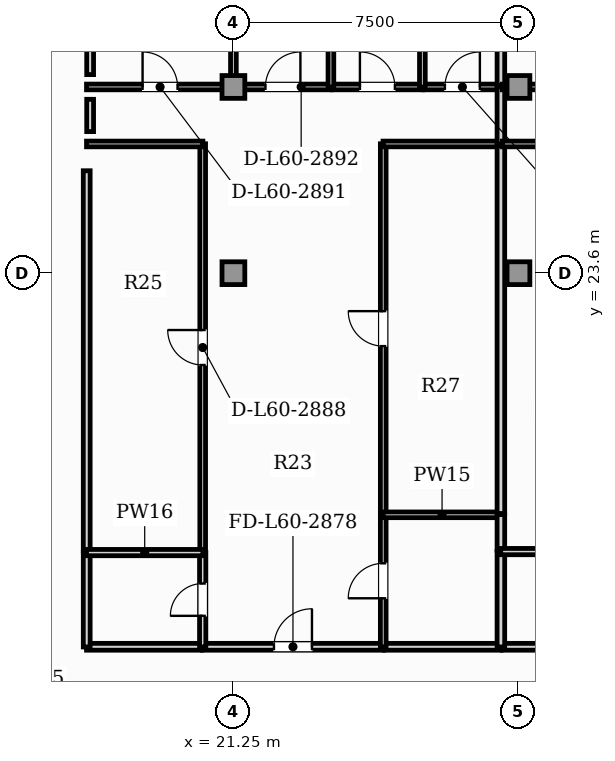
"""IFC4 building model, lengths in metres.
Left out: names, types, materials, properties, quantities, classifications, styles, units other than length and angle.
Written with IfcOpenShell. Run it as: python <this file> out.ifc"""

import sys

from ifc_helpers import new_model, si_unit, direction, frame, frame_2d, origin, origin_2d, place, context, subcontext, project, spatial, rectangle, extrude, element, fill, save


model = new_model("IFC4")
c1 = context("Model", 3, precision=1e-05, world=origin(), true_north=direction((0.0, 1.0)))
c2 = subcontext(c1, "Body", "Model", "MODEL_VIEW")
j1 = project(units=[si_unit("LENGTHUNIT", "METRE"), si_unit("PLANEANGLEUNIT", "RADIAN")], contexts=[c1])
p1 = place(None, origin())
s1 = spatial("IfcSite", under=j1, at=p1, CompositionType="ELEMENT")
p2 = place(p1, origin())
s2 = spatial("IfcBuilding", under=s1, at=p2, CompositionType="ELEMENT")
p3 = place(p2, frame((0.0, 0.0, 242.65)))
s3 = spatial("IfcBuildingStorey", under=s2, at=p3, CompositionType="ELEMENT", Elevation=242.65)
for number, where, z_axis, x_axis in (
    (1, (21.25, 23.6, 0.0), (0.0, 0.0, 1.0), (1.0, 0.0, 0.0)),
    (2, (28.75, 23.6, 0.0), (0.0, 0.0, 1.0), (1.0, 0.0, 0.0)),
    (3, (21.25, 28.5, 0.0), (0.0, 0.0, 1.0), (1.0, 0.0, 0.0)),
    (4, (28.75, 28.5, 0.0), (0.0, 0.0, 1.0), (1.0, 0.0, 0.0)),
):
    element("IfcColumn", number, at=place(p3, frame(where, z_axis=z_axis, x_axis=x_axis)), inside=s3, PredefinedType="COLUMN", context=c2, shape_type="SweptSolid", body=[
        extrude(rectangle(XDim=0.6, YDim=0.6, at=origin_2d()), origin(), (0.0, 0.0, 1.0), 3.85),
    ])
p4 = place(p3, frame((20.437, 13.77, 0.0), z_axis=(0.0, 0.0, 1.0), x_axis=(1.0, 0.0, 0.0)))
e5 = element("IfcWall", 5, at=p4, inside=s3, PredefinedType="PARTITIONING", context=c2, shape_type="SweptSolid", body=[
    extrude(rectangle(XDim=4.76, YDim=0.18, at=frame_2d((2.38, 0.0))), origin(), (0.0, 0.0, 1.0), 3.5),
])
p5 = place(p4, frame((1.88, 0.0, 0.0)))
e6 = element("IfcOpeningElement", 6, at=p5, cuts=e5, PredefinedType="OPENING", context=c2, shape_type="SweptSolid", body=[
    extrude(rectangle(XDim=1.0, YDim=2.15, at=frame_2d((0.5, 1.075))), frame((0.0, 0.1, 0.0), z_axis=(0.0, -1.0, 0.0), x_axis=(1.0, 0.0, 0.0)), (0.0, 0.0, 1.0), 0.2),
])
p6 = place(p3, frame((17.385, 13.77, 0.0), z_axis=(0.0, 0.0, 1.0), x_axis=(1.0, 0.0, 0.0)))
e7 = element("IfcWall", 7, at=p6, inside=s3, PredefinedType="PARTITIONING", context=c2, shape_type="SweptSolid", body=[
    extrude(rectangle(XDim=3.021, YDim=0.18, at=frame_2d((1.511, 0.0))), origin(), (0.0, 0.0, 1.0), 3.5),
])
p7 = place(p3, frame((17.39, 13.765, 0.0), z_axis=(0.0, 0.0, 1.0), x_axis=(0.0, 1.0, 0.0)))
e8 = element("IfcWall", 8, at=p7, inside=s3, PredefinedType="PARTITIONING", context=c2, shape_type="SweptSolid", body=[
    extrude(rectangle(XDim=2.489, YDim=0.18, at=frame_2d((1.244, 0.0))), origin(), (0.0, 0.0, 1.0), 3.5),
])
p8 = place(p3, frame((17.39, 16.283, 0.0), z_axis=(0.0, 0.0, 1.0), x_axis=(0.0, 1.0, 0.0)))
e9 = element("IfcWall", 9, at=p8, inside=s3, PredefinedType="PARTITIONING", context=c2, shape_type="SweptSolid", body=[
    extrude(rectangle(XDim=10.011, YDim=0.18, at=frame_2d((5.006, 0.0))), origin(), (0.0, 0.0, 1.0), 3.5),
])
p9 = place(p3, frame((25.227, 13.77, 0.0), z_axis=(0.0, 0.0, 1.0), x_axis=(1.0, 0.0, 0.0)))
e10 = element("IfcWall", 10, at=p9, inside=s3, PredefinedType="PARTITIONING", context=c2, shape_type="SweptSolid", body=[
    extrude(rectangle(XDim=3.066, YDim=0.18, at=frame_2d((1.533, 0.0))), origin(), (0.0, 0.0, 1.0), 3.5),
])
p10 = place(p3, frame((28.323, 13.77, 0.0), z_axis=(0.0, 0.0, 1.0), x_axis=(1.0, 0.0, 0.0)))
e11 = element("IfcWall", 11, at=p10, inside=s3, PredefinedType="PARTITIONING", context=c2, shape_type="SweptSolid", body=[
    extrude(rectangle(XDim=2.949, YDim=0.18, at=frame_2d((1.475, 0.0))), origin(), (0.0, 0.0, 1.0), 3.5),
])
p11 = place(p3, frame((20.442, 13.765, 0.0), z_axis=(0.0, 0.0, 1.0), x_axis=(0.0, 1.0, 0.0)))
e12 = element("IfcWall", 12, at=p11, inside=s3, PredefinedType="PLUMBINGWALL", context=c2, shape_type="SweptSolid", body=[
    extrude(rectangle(XDim=2.489, YDim=0.165, at=frame_2d((1.244, 0.0))), origin(), (0.0, 0.0, 1.0), 3.5),
])
p12 = place(p11, frame((0.819, 0.0, 0.0)))
e13 = element("IfcOpeningElement", 13, at=p12, cuts=e12, PredefinedType="OPENING", context=c2, shape_type="SweptSolid", body=[
    extrude(rectangle(XDim=0.85, YDim=2.1, at=frame_2d((0.425, 1.05))), frame((0.0, 0.093, 0.0), z_axis=(0.0, -1.0, 0.0), x_axis=(1.0, 0.0, 0.0)), (0.0, 0.0, 1.0), 0.185),
])
p13 = place(p3, frame((20.442, 16.283, 0.0), z_axis=(0.0, 0.0, 1.0), x_axis=(0.0, 1.0, 0.0)))
e14 = element("IfcWall", 14, at=p13, inside=s3, PredefinedType="PARTITIONING", context=c2, shape_type="SweptSolid", body=[
    extrude(rectangle(XDim=10.721, YDim=0.15, at=frame_2d((5.361, 0.0))), origin(), (0.0, 0.0, 1.0), 3.5),
])
p14 = place(p13, frame((4.901, 0.0, 0.0)))
e15 = element("IfcOpeningElement", 15, at=p14, cuts=e14, PredefinedType="OPENING", context=c2, shape_type="SweptSolid", body=[
    extrude(rectangle(XDim=0.92, YDim=2.1, at=frame_2d((0.46, 1.05))), frame((0.0, 0.085, 0.0), z_axis=(0.0, -1.0, 0.0), x_axis=(1.0, 0.0, 0.0)), (0.0, 0.0, 1.0), 0.17),
])
p15 = place(p3, frame((17.385, 27.0, 0.0), z_axis=(0.0, 0.0, 1.0), x_axis=(1.0, 0.0, 0.0)))
e16 = element("IfcWall", 16, at=p15, inside=s3, PredefinedType="PARTITIONING", context=c2, shape_type="SweptSolid", body=[
    extrude(rectangle(XDim=3.062, YDim=0.15, at=frame_2d((1.531, 0.0))), origin(), (0.0, 0.0, 1.0), 3.5),
])
p16 = place(p3, frame((25.192, 13.765, 0.0), z_axis=(0.0, 0.0, 1.0), x_axis=(0.0, 1.0, 0.0)))
e17 = element("IfcWall", 17, at=p16, inside=s3, PredefinedType="PARTITIONING", context=c2, shape_type="SweptSolid", body=[
    extrude(rectangle(XDim=3.482, YDim=0.15, at=frame_2d((1.741, 0.0))), origin(), (0.0, 0.0, 1.0), 3.5),
])
p17 = place(p16, frame((1.281, 0.0, 0.0)))
e18 = element("IfcOpeningElement", 18, at=p17, cuts=e17, PredefinedType="OPENING", context=c2, shape_type="SweptSolid", body=[
    extrude(rectangle(XDim=0.92, YDim=2.1, at=frame_2d((0.46, 1.05))), frame((0.0, 0.085, 0.0), z_axis=(0.0, -1.0, 0.0), x_axis=(1.0, 0.0, 0.0)), (0.0, 0.0, 1.0), 0.17),
])
p18 = place(p3, frame((25.192, 17.277, 0.0), z_axis=(0.0, 0.0, 1.0), x_axis=(0.0, 1.0, 0.0)))
e19 = element("IfcWall", 19, at=p18, inside=s3, PredefinedType="PARTITIONING", context=c2, shape_type="SweptSolid", body=[
    extrude(rectangle(XDim=9.728, YDim=0.15, at=frame_2d((4.864, 0.0))), origin(), (0.0, 0.0, 1.0), 3.5),
])
p19 = place(p18, frame((4.404, 0.0, 0.0)))
e20 = element("IfcOpeningElement", 20, at=p19, cuts=e19, PredefinedType="OPENING", context=c2, shape_type="SweptSolid", body=[
    extrude(rectangle(XDim=0.92, YDim=2.1, at=frame_2d((0.46, 1.05))), frame((0.0, 0.085, 0.0), z_axis=(0.0, -1.0, 0.0), x_axis=(1.0, 0.0, 0.0)), (0.0, 0.0, 1.0), 0.17),
])
p20 = place(p3, frame((25.187, 27.0, 0.0), z_axis=(0.0, 0.0, 1.0), x_axis=(1.0, 0.0, 0.0)))
e21 = element("IfcWall", 21, at=p20, inside=s3, PredefinedType="PARTITIONING", context=c2, shape_type="SweptSolid", body=[
    extrude(rectangle(XDim=3.106, YDim=0.15, at=frame_2d((1.553, 0.0))), origin(), (0.0, 0.0, 1.0), 3.5),
])
p21 = place(p3, frame((17.385, 28.5, 0.0), z_axis=(0.0, 0.0, 1.0), x_axis=(1.0, 0.0, 0.0)))
e22 = element("IfcWall", 22, at=p21, inside=s3, PredefinedType="PARTITIONING", context=c2, shape_type="SweptSolid", body=[
    extrude(rectangle(XDim=3.87, YDim=0.15, at=frame_2d((1.935, 0.0))), origin(), (0.0, 0.0, 1.0), 2.956),
])
p22 = place(p21, frame((1.475, 0.0, 0.0)))
e23 = element("IfcOpeningElement", 23, at=p22, cuts=e22, PredefinedType="OPENING", context=c2, shape_type="SweptSolid", body=[
    extrude(rectangle(XDim=0.92, YDim=2.1, at=frame_2d((0.46, 1.05))), frame((0.0, 0.085, 0.0), z_axis=(0.0, -1.0, 0.0), x_axis=(1.0, 0.0, 0.0)), (0.0, 0.0, 1.0), 0.17),
])
p23 = place(p3, frame((21.285, 28.5, 0.0), z_axis=(0.0, 0.0, 1.0), x_axis=(1.0, 0.0, 0.0)))
e24 = element("IfcWall", 24, at=p23, inside=s3, PredefinedType="PARTITIONING", context=c2, shape_type="SweptSolid", body=[
    extrude(rectangle(XDim=2.536, YDim=0.15, at=frame_2d((1.268, 0.0))), origin(), (0.0, 0.0, 1.0), 2.956),
])
p24 = place(p23, frame((0.808, 0.0, 0.0)))
e25 = element("IfcOpeningElement", 25, at=p24, cuts=e24, PredefinedType="OPENING", context=c2, shape_type="SweptSolid", body=[
    extrude(rectangle(XDim=0.92, YDim=2.1, at=frame_2d((0.46, 1.05))), frame((0.0, 0.085, 0.0), z_axis=(0.0, -1.0, 0.0), x_axis=(1.0, 0.0, 0.0)), (0.0, 0.0, 1.0), 0.17),
])
p25 = place(p3, frame((23.851, 28.5, 0.0), z_axis=(0.0, 0.0, 1.0), x_axis=(1.0, 0.0, 0.0)))
e26 = element("IfcWall", 26, at=p25, inside=s3, PredefinedType="PARTITIONING", context=c2, shape_type="SweptSolid", body=[
    extrude(rectangle(XDim=2.376, YDim=0.15, at=frame_2d((1.188, 0.0))), origin(), (0.0, 0.0, 1.0), 2.956),
])
p26 = place(p25, frame((0.728, 0.0, 0.0)))
e27 = element("IfcOpeningElement", 27, at=p26, cuts=e26, PredefinedType="OPENING", context=c2, shape_type="SweptSolid", body=[
    extrude(rectangle(XDim=0.92, YDim=2.1, at=frame_2d((0.46, 1.05))), frame((0.0, 0.085, 0.0), z_axis=(0.0, -1.0, 0.0), x_axis=(1.0, 0.0, 0.0)), (0.0, 0.0, 1.0), 0.17),
])
p27 = place(p3, frame((26.257, 28.5, 0.0), z_axis=(0.0, 0.0, 1.0), x_axis=(1.0, 0.0, 0.0)))
e28 = element("IfcWall", 28, at=p27, inside=s3, PredefinedType="PARTITIONING", context=c2, shape_type="SweptSolid", body=[
    extrude(rectangle(XDim=2.036, YDim=0.15, at=frame_2d((1.018, 0.0))), origin(), (0.0, 0.0, 1.0), 2.956),
])
p28 = place(p27, frame((0.558, 0.0, 0.0)))
e29 = element("IfcOpeningElement", 29, at=p28, cuts=e28, PredefinedType="OPENING", context=c2, shape_type="SweptSolid", body=[
    extrude(rectangle(XDim=0.92, YDim=2.1, at=frame_2d((0.46, 1.05))), frame((0.0, 0.085, 0.0), z_axis=(0.0, -1.0, 0.0), x_axis=(1.0, 0.0, 0.0)), (0.0, 0.0, 1.0), 0.17),
])
p29 = place(p3, frame((28.288, 26.995, 0.0), z_axis=(0.0, 0.0, 1.0), x_axis=(0.0, 1.0, 0.0)))
e30 = element("IfcWall", 30, at=p29, inside=s3, PredefinedType="PARTITIONING", context=c2, shape_type="SweptSolid", body=[
    extrude(rectangle(XDim=1.51, YDim=0.2, at=frame_2d((0.755, 0.0))), origin(), (0.0, 0.0, 1.0), 3.5),
])
p30 = place(p3, frame((17.385, 16.248, 0.0), z_axis=(0.0, 0.0, 1.0), x_axis=(1.0, 0.0, 0.0)))
e31 = element("IfcWall", 31, at=p30, inside=s3, PredefinedType="PLUMBINGWALL", context=c2, shape_type="SweptSolid", body=[
    extrude(rectangle(XDim=3.062, YDim=0.165, at=frame_2d((1.531, 0.0))), origin(), (0.0, 0.0, 1.0), 3.5),
])
p31 = place(p3, frame((25.187, 17.242, 0.0), z_axis=(0.0, 0.0, 1.0), x_axis=(1.0, 0.0, 0.0)))
e32 = element("IfcWall", 32, at=p31, inside=s3, PredefinedType="PARTITIONING", context=c2, shape_type="SweptSolid", body=[
    extrude(rectangle(XDim=3.106, YDim=0.15, at=frame_2d((1.553, 0.0))), origin(), (0.0, 0.0, 1.0), 3.5),
])
p32 = place(p3, frame((28.288, 13.765, 0.0), z_axis=(0.0, 0.0, 1.0), x_axis=(0.0, 1.0, 0.0)))
e33 = element("IfcWall", 33, at=p32, inside=s3, PredefinedType="PARTITIONING", context=c2, shape_type="SweptSolid", body=[
    extrude(rectangle(XDim=2.515, YDim=0.2, at=frame_2d((1.257, 0.0))), origin(), (0.0, 0.0, 1.0), 3.5),
])
p33 = place(p3, frame((28.288, 16.31, 0.0), z_axis=(0.0, 0.0, 1.0), x_axis=(0.0, 1.0, 0.0)))
e34 = element("IfcWall", 34, at=p33, inside=s3, PredefinedType="PARTITIONING", context=c2, shape_type="SweptSolid", body=[
    extrude(rectangle(XDim=0.937, YDim=0.2, at=frame_2d((0.469, 0.0))), origin(), (0.0, 0.0, 1.0), 3.5),
])
p34 = place(p3, frame((28.288, 17.277, 0.0), z_axis=(0.0, 0.0, 1.0), x_axis=(0.0, 1.0, 0.0)))
e35 = element("IfcWall", 35, at=p34, inside=s3, PredefinedType="PARTITIONING", context=c2, shape_type="SweptSolid", body=[
    extrude(rectangle(XDim=9.688, YDim=0.2, at=frame_2d((4.844, 0.0))), origin(), (0.0, 0.0, 1.0), 3.5),
])
for number, where, z_axis, x_axis in (
    (36, (21.25, 28.495, 0.0), (0.0, 0.0, 1.0), (0.0, 1.0, 0.0)),
    (37, (23.815, 28.495, 0.0), (0.0, 0.0, 1.0), (0.0, 1.0, 0.0)),
    (38, (26.222, 28.495, 0.0), (0.0, 0.0, 1.0), (0.0, 1.0, 0.0)),
):
    element("IfcWall", number, at=place(p3, frame(where, z_axis=z_axis, x_axis=x_axis)), inside=s3, PredefinedType="PARTITIONING", context=c2, shape_type="SweptSolid", body=[
        extrude(rectangle(XDim=7.916, YDim=0.15, at=frame_2d((3.958, 0.0))), origin(), (0.0, 0.0, 1.0), 3.5),
    ])
p35 = place(p3, frame((28.288, 28.535, 0.0), z_axis=(0.0, 0.0, 1.0), x_axis=(0.0, 1.0, 0.0)))
e39 = element("IfcWall", 39, at=p35, inside=s3, PredefinedType="PARTITIONING", context=c2, shape_type="SweptSolid", body=[
    extrude(rectangle(XDim=7.876, YDim=0.2, at=frame_2d((3.938, 0.0))), origin(), (0.0, 0.0, 1.0), 3.5),
])
p36 = place(p3, frame((28.323, 27.0, 0.0), z_axis=(0.0, 0.0, 1.0), x_axis=(1.0, 0.0, 0.0)))
e40 = element("IfcWall", 40, at=p36, inside=s3, PredefinedType="PARTITIONING", context=c2, shape_type="SweptSolid", body=[
    extrude(rectangle(XDim=2.989, YDim=0.15, at=frame_2d((1.495, 0.0))), origin(), (0.0, 0.0, 1.0), 3.5),
])
p37 = place(p3, frame((28.323, 28.5, 0.0), z_axis=(0.0, 0.0, 1.0), x_axis=(1.0, 0.0, 0.0)))
e41 = element("IfcWall", 41, at=p37, inside=s3, PredefinedType="PARTITIONING", context=c2, shape_type="SweptSolid", body=[
    extrude(rectangle(XDim=3.064, YDim=0.15, at=frame_2d((1.532, 0.0))), origin(), (0.0, 0.0, 1.0), 2.956),
])
p38 = place(p37, frame((1.072, 0.0, 0.0)))
e42 = element("IfcOpeningElement", 42, at=p38, cuts=e41, PredefinedType="OPENING", context=c2, shape_type="SweptSolid", body=[
    extrude(rectangle(XDim=0.92, YDim=2.1, at=frame_2d((0.46, 1.05))), frame((0.0, 0.085, 0.0), z_axis=(0.0, -1.0, 0.0), x_axis=(1.0, 0.0, 0.0)), (0.0, 0.0, 1.0), 0.17),
])
p39 = place(p3, frame((28.283, 16.275, 0.0), z_axis=(0.0, 0.0, 1.0), x_axis=(1.0, 0.0, 0.0)))
e43 = element("IfcWall", 43, at=p39, inside=s3, PredefinedType="PLUMBINGWALL", context=c2, shape_type="SweptSolid", body=[
    extrude(rectangle(XDim=3.029, YDim=0.165, at=frame_2d((1.515, 0.0))), origin(), (0.0, 0.0, 1.0), 3.5),
])
p40 = place(p3, frame((17.48, 27.325, 0.0), z_axis=(0.0, 0.0, 1.0), x_axis=(0.0, 1.0, 0.0)))
e44 = element("IfcWall", 44, at=p40, inside=s3, PredefinedType="PARTITIONING", context=c2, shape_type="SweptSolid", body=[
    extrude(rectangle(XDim=0.85, YDim=0.18, at=frame_2d((0.425, 0.0))), origin(), (0.0, 0.0, 1.0), 3.5),
])
p41 = place(p3, frame((17.48, 28.825, 0.0), z_axis=(0.0, 0.0, 1.0), x_axis=(0.0, 1.0, 0.0)))
e45 = element("IfcWall", 45, at=p41, inside=s3, PredefinedType="PARTITIONING", context=c2, shape_type="SweptSolid", body=[
    extrude(rectangle(XDim=7.586, YDim=0.18, at=frame_2d((3.793, 0.0))), origin(), (0.0, 0.0, 1.0), 3.5),
])
p42 = place(p5, origin())
e46 = element("IfcDoor", 46, at=p42, inside=s3, OperationType="SINGLE_SWING_RIGHT", PredefinedType="DOOR", context=c2, shape_type="SweptSolid", body=[
    extrude(rectangle(XDim=1.0, YDim=2.15, at=frame_2d((0.5, 1.075))), frame((0.0, 0.025, 0.0), z_axis=(0.0, -1.0, 0.0), x_axis=(1.0, 0.0, 0.0)), (0.0, 0.0, 1.0), 0.05),
])
fill(e6, e46)
p43 = place(p12, origin())
e47 = element("IfcDoor", 47, at=p43, inside=s3, OperationType="SINGLE_SWING_LEFT", PredefinedType="DOOR", context=c2, shape_type="SweptSolid", body=[
    extrude(rectangle(XDim=0.85, YDim=2.1, at=frame_2d((0.425, 1.05))), frame((0.0, 0.025, 0.0), z_axis=(0.0, -1.0, 0.0), x_axis=(1.0, 0.0, 0.0)), (0.0, 0.0, 1.0), 0.05),
])
fill(e13, e47)
p44 = place(p14, origin())
e48 = element("IfcDoor", 48, at=p44, inside=s3, OperationType="SINGLE_SWING_RIGHT", PredefinedType="DOOR", context=c2, shape_type="SweptSolid", body=[
    extrude(rectangle(XDim=0.92, YDim=2.1, at=frame_2d((0.46, 1.05))), frame((0.0, 0.025, 0.0), z_axis=(0.0, -1.0, 0.0), x_axis=(1.0, 0.0, 0.0)), (0.0, 0.0, 1.0), 0.05),
])
fill(e15, e48)
p45 = place(p17, origin())
e49 = element("IfcDoor", 49, at=p45, inside=s3, OperationType="SINGLE_SWING_LEFT", PredefinedType="DOOR", context=c2, shape_type="SweptSolid", body=[
    extrude(rectangle(XDim=0.92, YDim=2.1, at=frame_2d((0.46, 1.05))), frame((0.0, 0.025, 0.0), z_axis=(0.0, -1.0, 0.0), x_axis=(1.0, 0.0, 0.0)), (0.0, 0.0, 1.0), 0.05),
])
fill(e18, e49)
p46 = place(p19, origin())
e50 = element("IfcDoor", 50, at=p46, inside=s3, OperationType="SINGLE_SWING_RIGHT", PredefinedType="DOOR", context=c2, shape_type="SweptSolid", body=[
    extrude(rectangle(XDim=0.92, YDim=2.1, at=frame_2d((0.46, 1.05))), frame((0.0, 0.025, 0.0), z_axis=(0.0, -1.0, 0.0), x_axis=(1.0, 0.0, 0.0)), (0.0, 0.0, 1.0), 0.05),
])
fill(e20, e50)
p47 = place(p22, origin())
e51 = element("IfcDoor", 51, at=p47, inside=s3, OperationType="SINGLE_SWING_LEFT", PredefinedType="DOOR", context=c2, shape_type="SweptSolid", body=[
    extrude(rectangle(XDim=0.92, YDim=2.1, at=frame_2d((0.46, 1.05))), frame((0.0, 0.025, 0.0), z_axis=(0.0, -1.0, 0.0), x_axis=(1.0, 0.0, 0.0)), (0.0, 0.0, 1.0), 0.05),
])
fill(e23, e51)
p48 = place(p24, origin())
e52 = element("IfcDoor", 52, at=p48, inside=s3, OperationType="SINGLE_SWING_RIGHT", PredefinedType="DOOR", context=c2, shape_type="SweptSolid", body=[
    extrude(rectangle(XDim=0.92, YDim=2.1, at=frame_2d((0.46, 1.05))), frame((0.0, 0.025, 0.0), z_axis=(0.0, -1.0, 0.0), x_axis=(1.0, 0.0, 0.0)), (0.0, 0.0, 1.0), 0.05),
])
fill(e25, e52)
p49 = place(p26, origin())
e53 = element("IfcDoor", 53, at=p49, inside=s3, OperationType="SINGLE_SWING_LEFT", PredefinedType="DOOR", context=c2, shape_type="SweptSolid", body=[
    extrude(rectangle(XDim=0.92, YDim=2.1, at=frame_2d((0.46, 1.05))), frame((0.0, 0.025, 0.0), z_axis=(0.0, -1.0, 0.0), x_axis=(1.0, 0.0, 0.0)), (0.0, 0.0, 1.0), 0.05),
])
fill(e27, e53)
p50 = place(p28, origin())
e54 = element("IfcDoor", 54, at=p50, inside=s3, OperationType="SINGLE_SWING_RIGHT", PredefinedType="DOOR", context=c2, shape_type="SweptSolid", body=[
    extrude(rectangle(XDim=0.92, YDim=2.1, at=frame_2d((0.46, 1.05))), frame((0.0, 0.025, 0.0), z_axis=(0.0, -1.0, 0.0), x_axis=(1.0, 0.0, 0.0)), (0.0, 0.0, 1.0), 0.05),
])
fill(e29, e54)
save(model, sys.argv[1])
